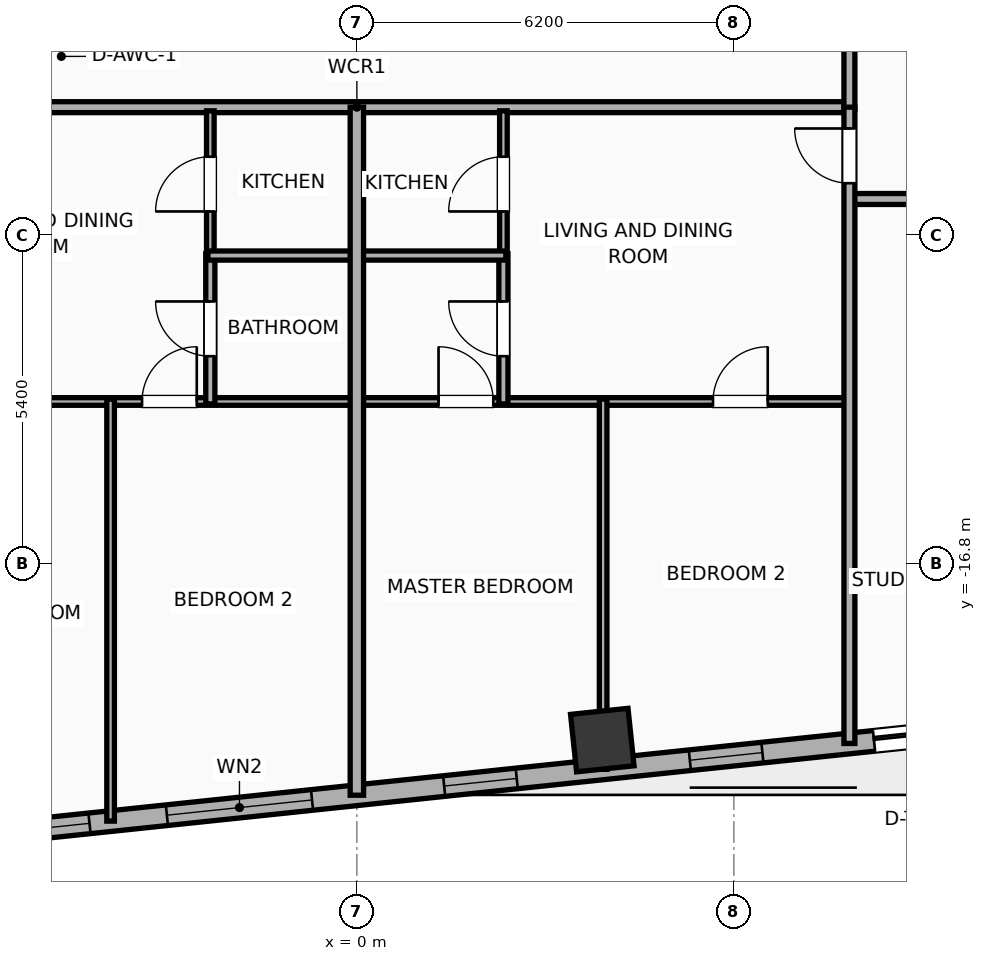
"""IFC4 building model, lengths in metres.
Left out: names, types, materials, properties, quantities, classifications, styles, units other than length and angle.
Written with IfcOpenShell. Run it as: python <this file> out.ifc"""

import sys

from ifc_helpers import new_model, si_unit, direction, frame, frame_2d, origin, origin_2d, place, context, subcontext, project, spatial, rectangle, hollow_rectangle, extrude, element, fill, save


model = new_model("IFC4")
c1 = context("Model", 3, precision=1e-05, world=origin(), true_north=direction((0.0, 1.0)))
c2 = subcontext(c1, "Body", "Model", "MODEL_VIEW")
j1 = project(units=[si_unit("LENGTHUNIT", "METRE"), si_unit("PLANEANGLEUNIT", "RADIAN")], contexts=[c1])
p1 = place(None, origin())
s1 = spatial("IfcSite", under=j1, at=p1, CompositionType="ELEMENT")
p2 = place(p1, origin())
s2 = spatial("IfcBuilding", under=s1, at=p2, CompositionType="ELEMENT")
p3 = place(p2, frame((0.0, 0.0, 140.4)))
s3 = spatial("IfcBuildingStorey", under=s2, at=p3, CompositionType="ELEMENT", Elevation=140.4)
p4 = place(p3, frame((4.036, -19.698, -0.4), z_axis=(0.0, 0.0, 1.0), x_axis=(0.994521895368, 0.104528463268, 0.0)))
e1 = element("IfcColumn", 1, at=p4, inside=s3, PredefinedType="COLUMN", context=c2, shape_type="SweptSolid", body=[
    extrude(hollow_rectangle(XDim=0.95, YDim=0.95, WallThickness=0.032, at=origin_2d()), origin(), (0.0, 0.0, 1.0), 4.3),
])
p5 = place(p3, frame((24.756, -18.003, 0.0), z_axis=(0.0, 0.0, 1.0), x_axis=(-0.99452160744, -0.104531202687, 0.0)))
e2 = element("IfcWall", 2, at=p5, inside=s3, PredefinedType="ELEMENTEDWALL", context=c2, shape_type="SweptSolid", body=[
    extrude(rectangle(XDim=51.967, YDim=0.34, at=frame_2d((25.983, 0.0))), origin(), (0.0, 0.0, 1.0), 2.54),
])
p6 = place(p5, frame((14.84, 0.0, 0.0)))
e3 = element("IfcOpeningElement", 3, at=p6, cuts=e2, PredefinedType="OPENING", context=c2, shape_type="SweptSolid", body=[
    extrude(rectangle(XDim=1.5, YDim=2.05, at=frame_2d((0.75, 1.025))), frame((0.0, 0.18, 0.0), z_axis=(0.0, -1.0, 0.0), x_axis=(1.0, 0.0, 0.0)), (0.0, 0.0, 1.0), 0.36),
])
p7 = place(p5, frame((25.633, 0.0, 0.75)))
e4 = element("IfcOpeningElement", 4, at=p7, cuts=e2, PredefinedType="OPENING", context=c2, shape_type="SweptSolid", body=[
    extrude(rectangle(XDim=2.4, YDim=1.63, at=frame_2d((1.2, 0.815))), frame((0.0, 0.18, 0.0), z_axis=(0.0, -1.0, 0.0), x_axis=(1.0, 0.0, 0.0)), (0.0, 0.0, 1.0), 0.36),
])
p8 = place(p5, frame((42.955, 0.0, 0.75)))
e5 = element("IfcOpeningElement", 5, at=p8, cuts=e2, PredefinedType="OPENING", context=c2, shape_type="SweptSolid", body=[
    extrude(rectangle(XDim=2.4, YDim=1.63, at=frame_2d((1.2, 0.815))), frame((0.0, 0.18, 0.0), z_axis=(0.0, -1.0, 0.0), x_axis=(1.0, 0.0, 0.0)), (0.0, 0.0, 1.0), 0.36),
])
p9 = place(p5, frame((34.121, 0.0, 0.75)))
e6 = element("IfcOpeningElement", 6, at=p9, cuts=e2, PredefinedType="OPENING", context=c2, shape_type="SweptSolid", body=[
    extrude(rectangle(XDim=1.2, YDim=1.63, at=frame_2d((0.6, 0.815))), frame((0.0, 0.18, 0.0), z_axis=(0.0, -1.0, 0.0), x_axis=(1.0, 0.0, 0.0)), (0.0, 0.0, 1.0), 0.36),
])
p10 = place(p5, frame((37.092, 0.0, 0.75)))
e7 = element("IfcOpeningElement", 7, at=p10, cuts=e2, PredefinedType="OPENING", context=c2, shape_type="SweptSolid", body=[
    extrude(rectangle(XDim=1.2, YDim=1.63, at=frame_2d((0.6, 0.815))), frame((0.0, 0.18, 0.0), z_axis=(0.0, -1.0, 0.0), x_axis=(1.0, 0.0, 0.0)), (0.0, 0.0, 1.0), 0.36),
])
p11 = place(p5, frame((11.388, 0.0, 0.75)))
e8 = element("IfcOpeningElement", 8, at=p11, cuts=e2, PredefinedType="OPENING", context=c2, shape_type="SweptSolid", body=[
    extrude(rectangle(XDim=1.2, YDim=1.63, at=frame_2d((0.6, 0.815))), frame((0.0, 0.18, 0.0), z_axis=(0.0, -1.0, 0.0), x_axis=(1.0, 0.0, 0.0)), (0.0, 0.0, 1.0), 0.36),
])
p12 = place(p5, frame((8.332, 0.0, 0.75)))
e9 = element("IfcOpeningElement", 9, at=p12, cuts=e2, PredefinedType="OPENING", context=c2, shape_type="SweptSolid", body=[
    extrude(rectangle(XDim=1.2, YDim=1.63, at=frame_2d((0.6, 0.815))), frame((0.0, 0.18, 0.0), z_axis=(0.0, -1.0, 0.0), x_axis=(1.0, 0.0, 0.0)), (0.0, 0.0, 1.0), 0.36),
])
p13 = place(p5, frame((5.331, 0.0, 0.75)))
e10 = element("IfcOpeningElement", 10, at=p13, cuts=e2, PredefinedType="OPENING", context=c2, shape_type="SweptSolid", body=[
    extrude(rectangle(XDim=1.2, YDim=1.63, at=frame_2d((0.6, 0.815))), frame((0.0, 0.18, 0.0), z_axis=(0.0, -1.0, 0.0), x_axis=(1.0, 0.0, 0.0)), (0.0, 0.0, 1.0), 0.36),
])
p14 = place(p5, frame((29.313, 0.0, 0.75)))
e11 = element("IfcOpeningElement", 11, at=p14, cuts=e2, PredefinedType="OPENING", context=c2, shape_type="SweptSolid", body=[
    extrude(rectangle(XDim=1.2, YDim=1.63, at=frame_2d((0.6, 0.815))), frame((0.0, 0.18, 0.0), z_axis=(0.0, -1.0, 0.0), x_axis=(1.0, 0.0, 0.0)), (0.0, 0.0, 1.0), 0.36),
])
p15 = place(p5, frame((22.248, 0.0, 0.75)))
e12 = element("IfcOpeningElement", 12, at=p15, cuts=e2, PredefinedType="OPENING", context=c2, shape_type="SweptSolid", body=[
    extrude(rectangle(XDim=1.2, YDim=1.63, at=frame_2d((0.6, 0.815))), frame((0.0, 0.18, 0.0), z_axis=(0.0, -1.0, 0.0), x_axis=(1.0, 0.0, 0.0)), (0.0, 0.0, 1.0), 0.36),
])
p16 = place(p5, frame((18.186, 0.0, 0.75)))
e13 = element("IfcOpeningElement", 13, at=p16, cuts=e2, PredefinedType="OPENING", context=c2, shape_type="SweptSolid", body=[
    extrude(rectangle(XDim=1.2, YDim=1.63, at=frame_2d((0.6, 0.815))), frame((0.0, 0.18, 0.0), z_axis=(0.0, -1.0, 0.0), x_axis=(1.0, 0.0, 0.0)), (0.0, 0.0, 1.0), 0.36),
])
p17 = place(p5, frame((0.718, 0.0, 0.75)))
e14 = element("IfcOpeningElement", 14, at=p17, cuts=e2, PredefinedType="OPENING", context=c2, shape_type="SweptSolid", body=[
    extrude(rectangle(XDim=1.2, YDim=1.63, at=frame_2d((0.6, 0.815))), frame((0.0, 0.18, 0.0), z_axis=(0.0, -1.0, 0.0), x_axis=(1.0, 0.0, 0.0)), (0.0, 0.0, 1.0), 0.36),
])
p18 = place(p3, frame((-8.15, -9.29, 0.0), z_axis=(0.0, 0.0, 1.0), x_axis=(1.0, 0.0, 0.0)))
e15 = element("IfcWall", 15, at=p18, inside=s3, PredefinedType="PARTITIONING", context=c2, shape_type="SweptSolid", body=[
    extrude(rectangle(XDim=16.3, YDim=0.18, at=frame_2d((8.15, 0.0))), origin(), (0.0, 0.0, 1.0), 3.65),
])
p19 = place(p3, frame((8.1, -9.33, 0.0), z_axis=(0.0, 0.0, 1.0), x_axis=(0.0, 1.0, 0.0)))
e16 = element("IfcWall", 16, at=p19, inside=s3, PredefinedType="PARTITIONING", context=c2, shape_type="SweptSolid", body=[
    extrude(rectangle(XDim=8.41, YDim=0.18, at=frame_2d((4.205, 0.0))), origin(), (0.0, 0.0, 1.0), 3.65),
])
p20 = place(p3, frame((8.08, -10.8, 0.0), z_axis=(0.0, 0.0, 1.0), x_axis=(1.0, 0.0, 0.0)))
e17 = element("IfcWall", 17, at=p20, inside=s3, PredefinedType="PARTITIONING", context=c2, shape_type="SweptSolid", body=[
    extrude(rectangle(XDim=11.92, YDim=0.18, at=frame_2d((5.96, 0.0))), origin(), (0.0, 0.0, 1.0), 3.65),
])
p21 = place(p20, frame((1.251, 0.0, 0.0)))
e18 = element("IfcOpeningElement", 18, at=p21, cuts=e17, PredefinedType="OPENING", context=c2, shape_type="SweptSolid", body=[
    extrude(rectangle(XDim=1.15, YDim=2.05, at=frame_2d((0.575, 1.025))), frame((0.0, 0.1, 0.0), z_axis=(0.0, -1.0, 0.0), x_axis=(1.0, 0.0, 0.0)), (0.0, 0.0, 1.0), 0.2),
])
p22 = place(p20, frame((7.244, 0.0, 0.0)))
e19 = element("IfcOpeningElement", 19, at=p22, cuts=e17, PredefinedType="OPENING", context=c2, shape_type="SweptSolid", body=[
    extrude(rectangle(XDim=1.15, YDim=2.05, at=frame_2d((0.575, 1.025))), frame((0.0, 0.1, 0.0), z_axis=(0.0, -1.0, 0.0), x_axis=(1.0, 0.0, 0.0)), (0.0, 0.0, 1.0), 0.2),
])
p23 = place(p3, frame((-8.08, -14.13, 0.0), z_axis=(0.0, 0.0, 1.0), x_axis=(1.0, 0.0, 0.0)))
e20 = element("IfcWall", 20, at=p23, inside=s3, PredefinedType="PARTITIONING", context=c2, shape_type="SweptSolid", body=[
    extrude(rectangle(XDim=8.06, YDim=0.125, at=frame_2d((4.03, 0.0))), origin(), (0.0, 0.0, 1.0), 3.65),
])
p24 = place(p23, frame((1.323, 0.0, 0.0)))
e21 = element("IfcOpeningElement", 21, at=p24, cuts=e20, PredefinedType="OPENING", context=c2, shape_type="SweptSolid", body=[
    extrude(rectangle(XDim=0.9, YDim=2.05, at=frame_2d((0.45, 1.025))), frame((0.0, 0.073, 0.0), z_axis=(0.0, -1.0, 0.0), x_axis=(1.0, 0.0, 0.0)), (0.0, 0.0, 1.0), 0.145),
])
p25 = place(p23, frame((4.547, 0.0, 0.0)))
e22 = element("IfcOpeningElement", 22, at=p25, cuts=e20, PredefinedType="OPENING", context=c2, shape_type="SweptSolid", body=[
    extrude(rectangle(XDim=0.9, YDim=2.05, at=frame_2d((0.45, 1.025))), frame((0.0, 0.073, 0.0), z_axis=(0.0, -1.0, 0.0), x_axis=(1.0, 0.0, 0.0)), (0.0, 0.0, 1.0), 0.145),
])
p26 = place(p3, frame((-2.41, -11.76, 0.0), z_axis=(0.0, 0.0, 1.0), x_axis=(0.0, 1.0, 0.0)))
e23 = element("IfcWall", 23, at=p26, inside=s3, PredefinedType="PARTITIONING", context=c2, shape_type="SweptSolid", body=[
    extrude(rectangle(XDim=2.41, YDim=0.125, at=frame_2d((1.205, 0.0))), origin(), (0.0, 0.0, 1.0), 3.65),
])
p27 = place(p26, frame((0.755, 0.0, 0.0)))
e24 = element("IfcOpeningElement", 24, at=p27, cuts=e23, PredefinedType="OPENING", context=c2, shape_type="SweptSolid", body=[
    extrude(rectangle(XDim=0.9, YDim=2.05, at=frame_2d((0.45, 1.025))), frame((0.0, 0.073, 0.0), z_axis=(0.0, -1.0, 0.0), x_axis=(1.0, 0.0, 0.0)), (0.0, 0.0, 1.0), 0.145),
])
p28 = place(p3, frame((-2.41, -14.17, 0.0), z_axis=(0.0, 0.0, 1.0), x_axis=(0.0, 1.0, 0.0)))
e25 = element("IfcWall", 25, at=p28, inside=s3, PredefinedType="PLUMBINGWALL", context=c2, shape_type="SweptSolid", body=[
    extrude(rectangle(XDim=2.47, YDim=0.15, at=frame_2d((1.235, 0.0))), origin(), (0.0, 0.0, 1.0), 3.65),
])
p29 = place(p28, frame((0.785, 0.0, 0.0)))
e26 = element("IfcOpeningElement", 26, at=p29, cuts=e25, PredefinedType="OPENING", context=c2, shape_type="SweptSolid", body=[
    extrude(rectangle(XDim=0.9, YDim=2.05, at=frame_2d((0.45, 1.025))), frame((0.0, 0.085, 0.0), z_axis=(0.0, -1.0, 0.0), x_axis=(1.0, 0.0, 0.0)), (0.0, 0.0, 1.0), 0.17),
])
p30 = place(p3, frame((-2.45, -11.73, 0.0), z_axis=(0.0, 0.0, 1.0), x_axis=(1.0, 0.0, 0.0)))
e27 = element("IfcWall", 27, at=p30, inside=s3, PredefinedType="PLUMBINGWALL", context=c2, shape_type="SweptSolid", body=[
    extrude(rectangle(XDim=2.43, YDim=0.15, at=frame_2d((1.215, 0.0))), origin(), (0.0, 0.0, 1.0), 3.65),
])
p31 = place(p3, frame((-4.05, -21.031, 0.0), z_axis=(0.0, 0.0, 1.0), x_axis=(0.0, 1.0, 0.0)))
e28 = element("IfcWall", 28, at=p31, inside=s3, PredefinedType="PARTITIONING", context=c2, shape_type="SweptSolid", body=[
    extrude(rectangle(XDim=6.941, YDim=0.125, at=frame_2d((3.47, 0.0))), origin(), (0.0, 0.0, 1.0), 3.65),
])
p32 = place(p3, frame((0.02, -14.13, 0.0), z_axis=(0.0, 0.0, 1.0), x_axis=(1.0, 0.0, 0.0)))
e29 = element("IfcWall", 29, at=p32, inside=s3, PredefinedType="PARTITIONING", context=c2, shape_type="SweptSolid", body=[
    extrude(rectangle(XDim=8.06, YDim=0.125, at=frame_2d((4.03, 0.0))), origin(), (0.0, 0.0, 1.0), 3.65),
])
p33 = place(p32, frame((1.323, 0.0, 0.0)))
e30 = element("IfcOpeningElement", 30, at=p33, cuts=e29, PredefinedType="OPENING", context=c2, shape_type="SweptSolid", body=[
    extrude(rectangle(XDim=0.9, YDim=2.05, at=frame_2d((0.45, 1.025))), frame((0.0, 0.073, 0.0), z_axis=(0.0, -1.0, 0.0), x_axis=(1.0, 0.0, 0.0)), (0.0, 0.0, 1.0), 0.145),
])
p34 = place(p32, frame((5.837, 0.0, 0.0)))
e31 = element("IfcOpeningElement", 31, at=p34, cuts=e29, PredefinedType="OPENING", context=c2, shape_type="SweptSolid", body=[
    extrude(rectangle(XDim=0.9, YDim=2.05, at=frame_2d((0.45, 1.025))), frame((0.0, 0.073, 0.0), z_axis=(0.0, -1.0, 0.0), x_axis=(1.0, 0.0, 0.0)), (0.0, 0.0, 1.0), 0.145),
])
p35 = place(p3, frame((2.41, -11.76, 0.0), z_axis=(0.0, 0.0, 1.0), x_axis=(0.0, 1.0, 0.0)))
e32 = element("IfcWall", 32, at=p35, inside=s3, PredefinedType="PARTITIONING", context=c2, shape_type="SweptSolid", body=[
    extrude(rectangle(XDim=2.41, YDim=0.125, at=frame_2d((1.205, 0.0))), origin(), (0.0, 0.0, 1.0), 3.65),
])
p36 = place(p35, frame((0.755, 0.0, 0.0)))
e33 = element("IfcOpeningElement", 33, at=p36, cuts=e32, PredefinedType="OPENING", context=c2, shape_type="SweptSolid", body=[
    extrude(rectangle(XDim=0.9, YDim=2.05, at=frame_2d((0.45, 1.025))), frame((0.0, 0.073, 0.0), z_axis=(0.0, -1.0, 0.0), x_axis=(1.0, 0.0, 0.0)), (0.0, 0.0, 1.0), 0.145),
])
p37 = place(p3, frame((2.41, -14.17, 0.0), z_axis=(0.0, 0.0, 1.0), x_axis=(0.0, 1.0, 0.0)))
e34 = element("IfcWall", 34, at=p37, inside=s3, PredefinedType="PLUMBINGWALL", context=c2, shape_type="SweptSolid", body=[
    extrude(rectangle(XDim=2.47, YDim=0.15, at=frame_2d((1.235, 0.0))), origin(), (0.0, 0.0, 1.0), 3.65),
])
p38 = place(p37, frame((0.785, 0.0, 0.0)))
e35 = element("IfcOpeningElement", 35, at=p38, cuts=e34, PredefinedType="OPENING", context=c2, shape_type="SweptSolid", body=[
    extrude(rectangle(XDim=0.9, YDim=2.05, at=frame_2d((0.45, 1.025))), frame((0.0, 0.085, 0.0), z_axis=(0.0, -1.0, 0.0), x_axis=(1.0, 0.0, 0.0)), (0.0, 0.0, 1.0), 0.17),
])
p39 = place(p3, frame((0.02, -11.73, 0.0), z_axis=(0.0, 0.0, 1.0), x_axis=(1.0, 0.0, 0.0)))
e36 = element("IfcWall", 36, at=p39, inside=s3, PredefinedType="PLUMBINGWALL", context=c2, shape_type="SweptSolid", body=[
    extrude(rectangle(XDim=2.43, YDim=0.15, at=frame_2d((1.215, 0.0))), origin(), (0.0, 0.0, 1.0), 3.65),
])
p40 = place(p3, frame((4.05, -20.179, 0.0), z_axis=(0.0, 0.0, 1.0), x_axis=(0.0, 1.0, 0.0)))
e37 = element("IfcWall", 37, at=p40, inside=s3, PredefinedType="PARTITIONING", context=c2, shape_type="SweptSolid", body=[
    extrude(rectangle(XDim=6.089, YDim=0.125, at=frame_2d((3.045, 0.0))), origin(), (0.0, 0.0, 1.0), 2.54),
])
p41 = place(p3, frame((8.1, -19.754, 0.0), z_axis=(0.0, 0.0, 1.0), x_axis=(0.0, 1.0, 0.0)))
e38 = element("IfcWall", 38, at=p41, inside=s3, PredefinedType="PARTITIONING", context=c2, shape_type="SweptSolid", body=[
    extrude(rectangle(XDim=10.464, YDim=0.18, at=frame_2d((5.232, 0.0))), origin(), (0.0, 0.0, 1.0), 3.65),
])
p42 = place(p41, frame((9.213, 0.0, 0.0)))
e39 = element("IfcOpeningElement", 39, at=p42, cuts=e38, PredefinedType="OPENING", context=c2, shape_type="SweptSolid", body=[
    extrude(rectangle(XDim=0.9, YDim=2.05, at=frame_2d((0.45, 1.025))), frame((0.0, 0.1, 0.0), z_axis=(0.0, -1.0, 0.0), x_axis=(1.0, 0.0, 0.0)), (0.0, 0.0, 1.0), 0.2),
])
p43 = place(p3, frame((0.0, -20.605, 0.0), z_axis=(0.0, 0.0, 1.0), x_axis=(0.0, 1.0, 0.0)))
e40 = element("IfcWall", 40, at=p43, inside=s3, PredefinedType="PARTITIONING", context=c2, shape_type="SweptSolid", body=[
    extrude(rectangle(XDim=11.315, YDim=0.22, at=frame_2d((5.657, 0.0))), origin(), (0.0, 0.0, 1.0), 3.65),
])
p44 = place(p6, origin())
e41 = element("IfcDoor", 41, at=p44, inside=s3, OperationType="SLIDING_TO_RIGHT", PredefinedType="DOOR", context=c2, shape_type="SweptSolid", body=[
    extrude(rectangle(XDim=1.5, YDim=2.05, at=frame_2d((0.75, 1.025))), frame((0.0, 0.025, 0.0), z_axis=(0.0, -1.0, 0.0), x_axis=(1.0, 0.0, 0.0)), (0.0, 0.0, 1.0), 0.05),
])
fill(e3, e41)
p45 = place(p7, origin())
e42 = element("IfcWindow", 42, at=p45, inside=s3, PartitioningType="SINGLE_PANEL", PredefinedType="WINDOW", context=c2, shape_type="SweptSolid", body=[
    extrude(rectangle(XDim=2.4, YDim=1.63, at=frame_2d((1.2, 0.815))), frame((0.0, 0.03, 0.0), z_axis=(0.0, -1.0, 0.0), x_axis=(1.0, 0.0, 0.0)), (0.0, 0.0, 1.0), 0.06),
])
fill(e4, e42)
p46 = place(p14, origin())
e43 = element("IfcWindow", 43, at=p46, inside=s3, PartitioningType="SINGLE_PANEL", PredefinedType="WINDOW", context=c2, shape_type="SweptSolid", body=[
    extrude(rectangle(XDim=1.2, YDim=1.63, at=frame_2d((0.6, 0.815))), frame((0.0, 0.03, 0.0), z_axis=(0.0, -1.0, 0.0), x_axis=(1.0, 0.0, 0.0)), (0.0, 0.0, 1.0), 0.06),
])
fill(e11, e43)
p47 = place(p15, origin())
e44 = element("IfcWindow", 44, at=p47, inside=s3, PartitioningType="SINGLE_PANEL", PredefinedType="WINDOW", context=c2, shape_type="SweptSolid", body=[
    extrude(rectangle(XDim=1.2, YDim=1.63, at=frame_2d((0.6, 0.815))), frame((0.0, 0.03, 0.0), z_axis=(0.0, -1.0, 0.0), x_axis=(1.0, 0.0, 0.0)), (0.0, 0.0, 1.0), 0.06),
])
fill(e12, e44)
p48 = place(p16, origin())
e45 = element("IfcWindow", 45, at=p48, inside=s3, PartitioningType="SINGLE_PANEL", PredefinedType="WINDOW", context=c2, shape_type="SweptSolid", body=[
    extrude(rectangle(XDim=1.2, YDim=1.63, at=frame_2d((0.6, 0.815))), frame((0.0, 0.03, 0.0), z_axis=(0.0, -1.0, 0.0), x_axis=(1.0, 0.0, 0.0)), (0.0, 0.0, 1.0), 0.06),
])
fill(e13, e45)
p49 = place(p25, origin())
e46 = element("IfcDoor", 46, at=p49, inside=s3, OperationType="SINGLE_SWING_RIGHT", PredefinedType="DOOR", context=c2, shape_type="SweptSolid", body=[
    extrude(rectangle(XDim=0.9, YDim=2.05, at=frame_2d((0.45, 1.025))), frame((0.0, 0.025, 0.0), z_axis=(0.0, -1.0, 0.0), x_axis=(1.0, 0.0, 0.0)), (0.0, 0.0, 1.0), 0.05),
])
fill(e22, e46)
p50 = place(p27, origin())
e47 = element("IfcDoor", 47, at=p50, inside=s3, OperationType="SINGLE_SWING_LEFT", PredefinedType="DOOR", context=c2, shape_type="SweptSolid", body=[
    extrude(rectangle(XDim=0.9, YDim=2.05, at=frame_2d((0.45, 1.025))), frame((0.0, 0.025, 0.0), z_axis=(0.0, -1.0, 0.0), x_axis=(1.0, 0.0, 0.0)), (0.0, 0.0, 1.0), 0.05),
])
fill(e24, e47)
p51 = place(p29, origin())
e48 = element("IfcDoor", 48, at=p51, inside=s3, OperationType="SINGLE_SWING_RIGHT", PredefinedType="DOOR", context=c2, shape_type="SweptSolid", body=[
    extrude(rectangle(XDim=0.9, YDim=2.05, at=frame_2d((0.45, 1.025))), frame((0.0, 0.025, 0.0), z_axis=(0.0, -1.0, 0.0), x_axis=(1.0, 0.0, 0.0)), (0.0, 0.0, 1.0), 0.05),
])
fill(e26, e48)
p52 = place(p33, origin())
e49 = element("IfcDoor", 49, at=p52, inside=s3, OperationType="SINGLE_SWING_LEFT", PredefinedType="DOOR", context=c2, shape_type="SweptSolid", body=[
    extrude(rectangle(XDim=0.9, YDim=2.05, at=frame_2d((0.45, 1.025))), frame((0.0, 0.025, 0.0), z_axis=(0.0, -1.0, 0.0), x_axis=(1.0, 0.0, 0.0)), (0.0, 0.0, 1.0), 0.05),
])
fill(e30, e49)
p53 = place(p34, origin())
e50 = element("IfcDoor", 50, at=p53, inside=s3, OperationType="SINGLE_SWING_RIGHT", PredefinedType="DOOR", context=c2, shape_type="SweptSolid", body=[
    extrude(rectangle(XDim=0.9, YDim=2.05, at=frame_2d((0.45, 1.025))), frame((0.0, 0.025, 0.0), z_axis=(0.0, -1.0, 0.0), x_axis=(1.0, 0.0, 0.0)), (0.0, 0.0, 1.0), 0.05),
])
fill(e31, e50)
p54 = place(p36, origin())
e51 = element("IfcDoor", 51, at=p54, inside=s3, OperationType="SINGLE_SWING_LEFT", PredefinedType="DOOR", context=c2, shape_type="SweptSolid", body=[
    extrude(rectangle(XDim=0.9, YDim=2.05, at=frame_2d((0.45, 1.025))), frame((0.0, 0.025, 0.0), z_axis=(0.0, -1.0, 0.0), x_axis=(1.0, 0.0, 0.0)), (0.0, 0.0, 1.0), 0.05),
])
fill(e33, e51)
p55 = place(p38, origin())
e52 = element("IfcDoor", 52, at=p55, inside=s3, OperationType="SINGLE_SWING_RIGHT", PredefinedType="DOOR", context=c2, shape_type="SweptSolid", body=[
    extrude(rectangle(XDim=0.9, YDim=2.05, at=frame_2d((0.45, 1.025))), frame((0.0, 0.025, 0.0), z_axis=(0.0, -1.0, 0.0), x_axis=(1.0, 0.0, 0.0)), (0.0, 0.0, 1.0), 0.05),
])
fill(e35, e52)
p56 = place(p42, origin())
e53 = element("IfcDoor", 53, at=p56, inside=s3, OperationType="SINGLE_SWING_RIGHT", PredefinedType="DOOR", context=c2, shape_type="SweptSolid", body=[
    extrude(rectangle(XDim=0.9, YDim=2.05, at=frame_2d((0.45, 1.025))), frame((0.0, 0.025, 0.0), z_axis=(0.0, -1.0, 0.0), x_axis=(1.0, 0.0, 0.0)), (0.0, 0.0, 1.0), 0.05),
])
fill(e39, e53)
save(model, sys.argv[1])
